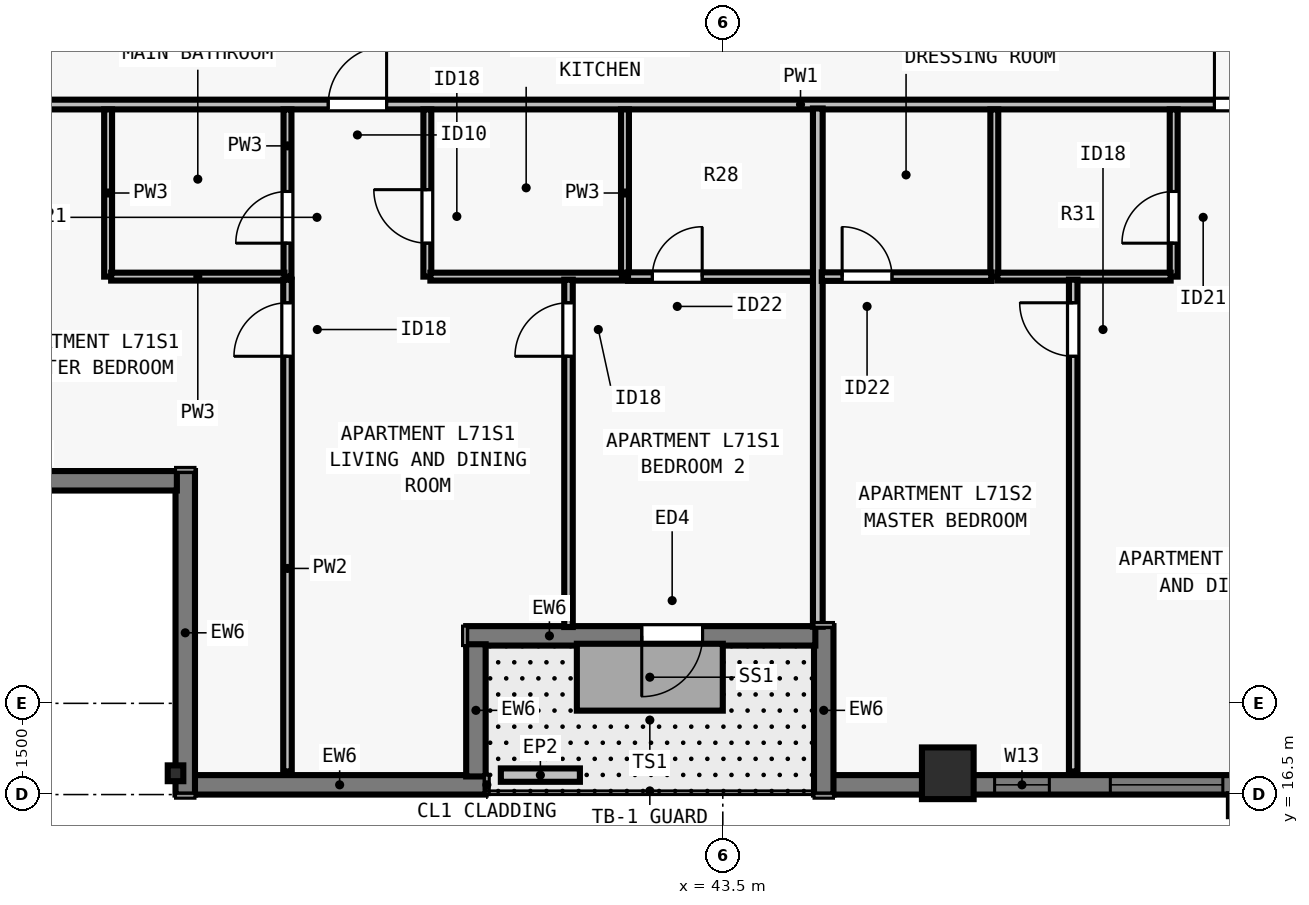
"""IFC4 building model, lengths in metres.
Left out: names, types, materials, properties, quantities, classifications, styles, units other than length and angle.
Written with IfcOpenShell. Run it as: python <this file> out.ifc"""

import sys

from ifc_helpers import new_model, si_unit, direction, frame, frame_2d, origin, origin_2d, place, context, subcontext, project, spatial, rectangle, i_section, extrude, element, fill, save


model = new_model("IFC4")
c1 = context("Model", 3, precision=1e-05, world=origin(), true_north=direction((0.0, 1.0)))
c2 = subcontext(c1, "Body", "Model", "MODEL_VIEW")
j1 = project(units=[si_unit("LENGTHUNIT", "METRE"), si_unit("PLANEANGLEUNIT", "RADIAN")], contexts=[c1])
p1 = place(None, origin())
s1 = spatial("IfcSite", under=j1, at=p1, CompositionType="ELEMENT")
p2 = place(p1, origin())
s2 = spatial("IfcBuilding", under=s1, at=p2, CompositionType="ELEMENT")
p3 = place(p2, frame((0.0, 0.0, 258.5)))
s3 = spatial("IfcBuildingStorey", under=s2, at=p3, CompositionType="ELEMENT", Elevation=258.5)
p4 = place(p3, frame((34.5, 16.85, 0.0), z_axis=(0.0, 0.0, 1.0), x_axis=(1.0, 0.0, 0.0)))
e1 = element("IfcColumn", 1, at=p4, inside=s3, PredefinedType="COLUMN", context=c2, shape_type="SweptSolid", body=[
    extrude(i_section(OverallWidth=0.256, OverallDepth=0.26, WebThickness=0.01, FlangeThickness=0.017, FilletRadius=0.013, at=origin_2d()), origin(), (0.0, 0.0, 1.0), 3.5),
])
p5 = place(p3, frame((47.2, 16.85, 0.0), z_axis=(0.0, 0.0, 1.0), x_axis=(1.0, 0.0, 0.0)))
e2 = element("IfcColumn", 2, at=p5, inside=s3, PredefinedType="COLUMN", context=c2, shape_type="SweptSolid", body=[
    extrude(rectangle(XDim=0.85, YDim=0.85, at=origin_2d()), origin(), (0.0, 0.0, 1.0), 3.5),
])
p6 = place(p3, frame((39.6, 16.66, 0.0), z_axis=(0.0, 0.0, 1.0), x_axis=(-1.0, 0.0, 0.0)))
e3 = element("IfcWall", 3, at=p6, inside=s3, PredefinedType="SOLIDWALL", context=c2, shape_type="SweptSolid", body=[
    extrude(rectangle(XDim=4.802, YDim=0.32, at=frame_2d((2.401, 0.0))), origin(), (0.0, 0.0, 1.0), 3.29),
])
p7 = place(p3, frame((34.66, 16.5, 0.0), z_axis=(0.0, 0.0, 1.0), x_axis=(0.0, 1.0, 0.0)))
e4 = element("IfcWall", 4, at=p7, inside=s3, PredefinedType="SOLIDWALL", context=c2, shape_type="SweptSolid", body=[
    extrude(rectangle(XDim=5.32, YDim=0.32, at=frame_2d((2.66, 0.0))), origin(), (0.0, 0.0, 1.0), 3.29),
])
p8 = place(p3, frame((34.522, 21.66, 0.0), z_axis=(0.0, 0.0, 1.0), x_axis=(-1.0, 0.0, 0.0)))
e5 = element("IfcWall", 5, at=p8, inside=s3, PredefinedType="SOLIDWALL", context=c2, shape_type="SweptSolid", body=[
    extrude(rectangle(XDim=4.724, YDim=0.32, at=frame_2d((2.362, 0.0))), origin(), (0.0, 0.0, 1.0), 3.29),
])
p9 = place(p3, frame((69.5, 16.66, 0.0), z_axis=(0.0, 0.0, 1.0), x_axis=(-1.0, 0.0, 0.0)))
e6 = element("IfcWall", 6, at=p9, inside=s3, PredefinedType="SOLIDWALL", context=c2, shape_type="SweptSolid", body=[
    extrude(rectangle(XDim=24.202, YDim=0.32, at=frame_2d((12.101, 0.0))), origin(), (0.0, 0.0, 1.0), 3.29),
])
p10 = place(p9, frame((8.026, 0.0, 0.8)))
e7 = element("IfcOpeningElement", 7, at=p10, cuts=e6, PredefinedType="OPENING", context=c2, shape_type="SweptSolid", body=[
    extrude(rectangle(XDim=1.55, YDim=1.678, at=frame_2d((0.775, 0.839))), frame((0.0, 0.17, 0.0), z_axis=(0.0, -1.0, 0.0), x_axis=(1.0, 0.0, 0.0)), (0.0, 0.0, 1.0), 0.34),
])
p11 = place(p9, frame((15.076, 0.0, 0.8)))
e8 = element("IfcOpeningElement", 8, at=p11, cuts=e6, PredefinedType="OPENING", context=c2, shape_type="SweptSolid", body=[
    extrude(rectangle(XDim=1.55, YDim=1.678, at=frame_2d((0.775, 0.839))), frame((0.0, 0.17, 0.0), z_axis=(0.0, -1.0, 0.0), x_axis=(1.0, 0.0, 0.0)), (0.0, 0.0, 1.0), 0.34),
])
p12 = place(p9, frame((17.777, 0.0, 0.8)))
e9 = element("IfcOpeningElement", 9, at=p12, cuts=e6, PredefinedType="OPENING", context=c2, shape_type="SweptSolid", body=[
    extrude(rectangle(XDim=1.85, YDim=1.678, at=frame_2d((0.925, 0.839))), frame((0.0, 0.17, 0.0), z_axis=(0.0, -1.0, 0.0), x_axis=(1.0, 0.0, 0.0)), (0.0, 0.0, 1.0), 0.34),
])
p13 = place(p9, frame((20.63, 0.0, 0.8)))
e10 = element("IfcOpeningElement", 10, at=p13, cuts=e6, PredefinedType="OPENING", context=c2, shape_type="SweptSolid", body=[
    extrude(rectangle(XDim=0.9, YDim=1.678, at=frame_2d((0.45, 0.839))), frame((0.0, 0.17, 0.0), z_axis=(0.0, -1.0, 0.0), x_axis=(1.0, 0.0, 0.0)), (0.0, 0.0, 1.0), 0.34),
])
p14 = place(p9, frame((10.87, 0.0, 0.8)))
e11 = element("IfcOpeningElement", 11, at=p14, cuts=e6, PredefinedType="OPENING", context=c2, shape_type="SweptSolid", body=[
    extrude(rectangle(XDim=0.9, YDim=1.678, at=frame_2d((0.45, 0.839))), frame((0.0, 0.17, 0.0), z_axis=(0.0, -1.0, 0.0), x_axis=(1.0, 0.0, 0.0)), (0.0, 0.0, 1.0), 0.34),
])
p15 = place(p3, frame((45.16, 16.5, 0.0), z_axis=(0.0, 0.0, 1.0), x_axis=(0.0, 1.0, 0.0)))
e12 = element("IfcWall", 12, at=p15, inside=s3, PredefinedType="SOLIDWALL", context=c2, shape_type="SweptSolid", body=[
    extrude(rectangle(XDim=2.77, YDim=0.32, at=frame_2d((1.385, 0.0))), origin(), (0.0, 0.0, 1.0), 3.29),
])
p16 = place(p3, frame((45.022, 19.11, 0.0), z_axis=(0.0, 0.0, 1.0), x_axis=(-1.0, 0.0, 0.0)))
e13 = element("IfcWall", 13, at=p16, inside=s3, PredefinedType="SOLIDWALL", context=c2, shape_type="SweptSolid", body=[
    extrude(rectangle(XDim=5.742, YDim=0.32, at=frame_2d((2.871, 0.0))), origin(), (0.0, 0.0, 1.0), 3.29),
])
p17 = place(p16, frame((1.855, 0.0, 0.0)))
e14 = element("IfcOpeningElement", 14, at=p17, cuts=e13, PredefinedType="OPENING", context=c2, shape_type="SweptSolid", body=[
    extrude(rectangle(XDim=1.0, YDim=2.15, at=frame_2d((0.5, 1.075))), frame((0.0, 0.17, 0.0), z_axis=(0.0, -1.0, 0.0), x_axis=(1.0, 0.0, 0.0)), (0.0, 0.0, 1.0), 0.34),
])
p18 = place(p3, frame((39.44, 18.972, 0.0), z_axis=(0.0, 0.0, 1.0), x_axis=(0.0, -1.0, 0.0)))
e15 = element("IfcWall", 15, at=p18, inside=s3, PredefinedType="SOLIDWALL", context=c2, shape_type="SweptSolid", body=[
    extrude(rectangle(XDim=2.174, YDim=0.32, at=frame_2d((1.087, 0.0))), origin(), (0.0, 0.0, 1.0), 3.29),
])
p19 = place(p3, frame((39.85, 16.82, 0.0), z_axis=(0.0, 0.0, 1.0), x_axis=(1.0, 0.0, 0.0)))
e16 = element("IfcWall", 16, at=p19, inside=s3, PredefinedType="PARAPET", context=c2, shape_type="SweptSolid", body=[
    extrude(rectangle(XDim=1.3, YDim=0.22, at=frame_2d((0.65, 0.0))), origin(), (0.0, 0.0, 1.0), 0.55),
])
p20 = place(p3, frame((29.805, 27.847, 0.0), z_axis=(0.0, 0.0, 1.0), x_axis=(1.0, 0.0, 0.0)))
e17 = element("IfcWall", 17, at=p20, inside=s3, PredefinedType="PARTITIONING", context=c2, shape_type="SweptSolid", body=[
    extrude(rectangle(XDim=44.39, YDim=0.16, at=frame_2d((22.195, 0.0))), origin(), (0.0, 0.0, 1.0), 2.958),
])
p21 = place(p20, frame((7.206, 0.0, 0.0)))
e18 = element("IfcOpeningElement", 18, at=p21, cuts=e17, PredefinedType="OPENING", context=c2, shape_type="SweptSolid", body=[
    extrude(rectangle(XDim=0.96, YDim=2.18, at=frame_2d((0.48, 1.09))), frame((0.0, 0.09, 0.0), z_axis=(0.0, -1.0, 0.0), x_axis=(1.0, 0.0, 0.0)), (0.0, 0.0, 1.0), 0.18),
])
p22 = place(p20, frame((21.78, 0.0, 0.0)))
e19 = element("IfcOpeningElement", 19, at=p22, cuts=e17, PredefinedType="OPENING", context=c2, shape_type="SweptSolid", body=[
    extrude(rectangle(XDim=0.96, YDim=2.18, at=frame_2d((0.48, 1.09))), frame((0.0, 0.09, 0.0), z_axis=(0.0, -1.0, 0.0), x_axis=(1.0, 0.0, 0.0)), (0.0, 0.0, 1.0), 0.18),
])
p23 = place(p20, frame((36.289, 0.0, 0.0)))
e20 = element("IfcOpeningElement", 20, at=p23, cuts=e17, PredefinedType="OPENING", context=c2, shape_type="SweptSolid", body=[
    extrude(rectangle(XDim=0.96, YDim=2.18, at=frame_2d((0.48, 1.09))), frame((0.0, 0.09, 0.0), z_axis=(0.0, -1.0, 0.0), x_axis=(1.0, 0.0, 0.0)), (0.0, 0.0, 1.0), 0.18),
])
p24 = place(p3, frame((33.391, 25.018, 0.0), z_axis=(0.0, 0.0, 1.0), x_axis=(0.0, 1.0, 0.0)))
e21 = element("IfcWall", 21, at=p24, inside=s3, PredefinedType="PLUMBINGWALL", context=c2, shape_type="SweptSolid", body=[
    extrude(rectangle(XDim=2.75, YDim=0.13, at=frame_2d((1.375, 0.0))), origin(), (0.0, 0.0, 1.0), 3.29),
])
p25 = place(p3, frame((36.341, 25.018, 0.0), z_axis=(0.0, 0.0, 1.0), x_axis=(0.0, 1.0, 0.0)))
e22 = element("IfcWall", 22, at=p25, inside=s3, PredefinedType="PLUMBINGWALL", context=c2, shape_type="SweptSolid", body=[
    extrude(rectangle(XDim=2.75, YDim=0.13, at=frame_2d((1.375, 0.0))), origin(), (0.0, 0.0, 1.0), 3.29),
])
p26 = place(p25, frame((0.55, 0.0, 0.0)))
e23 = element("IfcOpeningElement", 23, at=p26, cuts=e22, PredefinedType="OPENING", context=c2, shape_type="SweptSolid", body=[
    extrude(rectangle(XDim=0.85, YDim=2.08, at=frame_2d((0.425, 1.04))), frame((0.0, 0.075, 0.0), z_axis=(0.0, -1.0, 0.0), x_axis=(1.0, 0.0, 0.0)), (0.0, 0.0, 1.0), 0.15),
])
p27 = place(p3, frame((33.441, 25.018, 0.0), z_axis=(0.0, 0.0, 1.0), x_axis=(1.0, 0.0, 0.0)))
e24 = element("IfcWall", 24, at=p27, inside=s3, PredefinedType="PLUMBINGWALL", context=c2, shape_type="SweptSolid", body=[
    extrude(rectangle(XDim=2.85, YDim=0.13, at=frame_2d((1.425, 0.0))), origin(), (0.0, 0.0, 1.0), 2.958),
])
p28 = place(p3, frame((41.891, 25.018, 0.0), z_axis=(0.0, 0.0, 1.0), x_axis=(0.0, 1.0, 0.0)))
e25 = element("IfcWall", 25, at=p28, inside=s3, PredefinedType="PLUMBINGWALL", context=c2, shape_type="SweptSolid", body=[
    extrude(rectangle(XDim=2.75, YDim=0.13, at=frame_2d((1.375, 0.0))), origin(), (0.0, 0.0, 1.0), 3.29),
])
p29 = place(p3, frame((38.641, 25.018, 0.0), z_axis=(0.0, 0.0, 1.0), x_axis=(0.0, 1.0, 0.0)))
e26 = element("IfcWall", 26, at=p29, inside=s3, PredefinedType="PLUMBINGWALL", context=c2, shape_type="SweptSolid", body=[
    extrude(rectangle(XDim=2.75, YDim=0.13, at=frame_2d((1.375, 0.0))), origin(), (0.0, 0.0, 1.0), 3.29),
])
p30 = place(p29, frame((0.55, 0.0, 0.0)))
e27 = element("IfcOpeningElement", 27, at=p30, cuts=e26, PredefinedType="OPENING", context=c2, shape_type="SweptSolid", body=[
    extrude(rectangle(XDim=0.88, YDim=2.1, at=frame_2d((0.44, 1.05))), frame((0.0, 0.075, 0.0), z_axis=(0.0, -1.0, 0.0), x_axis=(1.0, 0.0, 0.0)), (0.0, 0.0, 1.0), 0.15),
])
p31 = place(p3, frame((38.691, 25.018, 0.0), z_axis=(0.0, 0.0, 1.0), x_axis=(1.0, 0.0, 0.0)))
e28 = element("IfcWall", 28, at=p31, inside=s3, PredefinedType="PLUMBINGWALL", context=c2, shape_type="SweptSolid", body=[
    extrude(rectangle(XDim=3.15, YDim=0.13, at=frame_2d((1.575, 0.0))), origin(), (0.0, 0.0, 1.0), 3.29),
])
p32 = place(p3, frame((36.341, 16.88, 0.0), z_axis=(0.0, 0.0, 1.0), x_axis=(0.0, 1.0, 0.0)))
e29 = element("IfcWall", 29, at=p32, inside=s3, PredefinedType="PARTITIONING", context=c2, shape_type="SweptSolid", body=[
    extrude(rectangle(XDim=8.088, YDim=0.14, at=frame_2d((4.044, 0.0))), origin(), (0.0, 0.0, 1.0), 2.573),
])
p33 = place(p32, frame((6.827, 0.0, 0.0)))
e30 = element("IfcOpeningElement", 30, at=p33, cuts=e29, PredefinedType="OPENING", context=c2, shape_type="SweptSolid", body=[
    extrude(rectangle(XDim=0.88, YDim=2.1, at=frame_2d((0.44, 1.05))), frame((0.0, 0.08, 0.0), z_axis=(0.0, -1.0, 0.0), x_axis=(1.0, 0.0, 0.0)), (0.0, 0.0, 1.0), 0.16),
])
p34 = place(p3, frame((40.962, 19.255, 0.0), z_axis=(0.0, 0.0, 1.0), x_axis=(0.0, 1.0, 0.0)))
e31 = element("IfcWall", 31, at=p34, inside=s3, PredefinedType="PARTITIONING", context=c2, shape_type="SweptSolid", body=[
    extrude(rectangle(XDim=5.713, YDim=0.14, at=frame_2d((2.856, 0.0))), origin(), (0.0, 0.0, 1.0), 3.29),
])
p35 = place(p34, frame((4.452, 0.0, 0.0)))
e32 = element("IfcOpeningElement", 32, at=p35, cuts=e31, PredefinedType="OPENING", context=c2, shape_type="SweptSolid", body=[
    extrude(rectangle(XDim=0.88, YDim=2.1, at=frame_2d((0.44, 1.05))), frame((0.0, 0.08, 0.0), z_axis=(0.0, -1.0, 0.0), x_axis=(1.0, 0.0, 0.0)), (0.0, 0.0, 1.0), 0.16),
])
p36 = place(p3, frame((41.941, 25.018, 0.0), z_axis=(0.0, 0.0, 1.0), x_axis=(1.0, 0.0, 0.0)))
e33 = element("IfcWall", 33, at=p36, inside=s3, PredefinedType="PARTITIONING", context=c2, shape_type="SweptSolid", body=[
    extrude(rectangle(XDim=3.171, YDim=0.14, at=frame_2d((1.586, 0.0))), origin(), (0.0, 0.0, 1.0), 3.29),
])
p37 = place(p36, frame((0.4, 0.0, 0.0)))
e34 = element("IfcOpeningElement", 34, at=p37, cuts=e33, PredefinedType="OPENING", context=c2, shape_type="SweptSolid", body=[
    extrude(rectangle(XDim=0.82, YDim=2.1, at=frame_2d((0.41, 1.05))), frame((0.0, 0.08, 0.0), z_axis=(0.0, -1.0, 0.0), x_axis=(1.0, 0.0, 0.0)), (0.0, 0.0, 1.0), 0.16),
])
p38 = place(p3, frame((45.062, 19.26, 0.0), z_axis=(0.0, 0.0, 1.0), x_axis=(0.0, 1.0, 0.0)))
e35 = element("IfcWall", 35, at=p38, inside=s3, PredefinedType="PARTITIONING", context=c2, shape_type="SweptSolid", body=[
    extrude(rectangle(XDim=8.522, YDim=0.16, at=frame_2d((4.261, 0.0))), origin(), (0.0, 0.0, 1.0), 3.29),
])
p39 = place(p3, frame((47.965, 25.018, 0.0), z_axis=(0.0, 0.0, 1.0), x_axis=(0.0, 1.0, 0.0)))
e36 = element("IfcWall", 36, at=p39, inside=s3, PredefinedType="PLUMBINGWALL", context=c2, shape_type="SweptSolid", body=[
    extrude(rectangle(XDim=2.75, YDim=0.13, at=frame_2d((1.375, 0.0))), origin(), (0.0, 0.0, 1.0), 3.29),
])
p40 = place(p3, frame((50.915, 25.018, 0.0), z_axis=(0.0, 0.0, 1.0), x_axis=(0.0, 1.0, 0.0)))
e37 = element("IfcWall", 37, at=p40, inside=s3, PredefinedType="PLUMBINGWALL", context=c2, shape_type="SweptSolid", body=[
    extrude(rectangle(XDim=2.75, YDim=0.13, at=frame_2d((1.375, 0.0))), origin(), (0.0, 0.0, 1.0), 3.29),
])
p41 = place(p40, frame((0.55, 0.0, 0.0)))
e38 = element("IfcOpeningElement", 38, at=p41, cuts=e37, PredefinedType="OPENING", context=c2, shape_type="SweptSolid", body=[
    extrude(rectangle(XDim=0.85, YDim=2.08, at=frame_2d((0.425, 1.04))), frame((0.0, 0.075, 0.0), z_axis=(0.0, -1.0, 0.0), x_axis=(1.0, 0.0, 0.0)), (0.0, 0.0, 1.0), 0.15),
])
p42 = place(p3, frame((48.015, 25.018, 0.0), z_axis=(0.0, 0.0, 1.0), x_axis=(1.0, 0.0, 0.0)))
e39 = element("IfcWall", 39, at=p42, inside=s3, PredefinedType="PLUMBINGWALL", context=c2, shape_type="SweptSolid", body=[
    extrude(rectangle(XDim=2.85, YDim=0.13, at=frame_2d((1.425, 0.0))), origin(), (0.0, 0.0, 1.0), 3.29),
])
p43 = place(p3, frame((49.262, 16.88, 0.0), z_axis=(0.0, 0.0, 1.0), x_axis=(0.0, 1.0, 0.0)))
e40 = element("IfcWall", 40, at=p43, inside=s3, PredefinedType="PARTITIONING", context=c2, shape_type="SweptSolid", body=[
    extrude(rectangle(XDim=8.088, YDim=0.14, at=frame_2d((4.044, 0.0))), origin(), (0.0, 0.0, 1.0), 2.958),
])
p44 = place(p43, frame((6.827, 0.0, 0.0)))
e41 = element("IfcOpeningElement", 41, at=p44, cuts=e40, PredefinedType="OPENING", context=c2, shape_type="SweptSolid", body=[
    extrude(rectangle(XDim=0.88, YDim=2.1, at=frame_2d((0.44, 1.05))), frame((0.0, 0.08, 0.0), z_axis=(0.0, -1.0, 0.0), x_axis=(1.0, 0.0, 0.0)), (0.0, 0.0, 1.0), 0.16),
])
p45 = place(p3, frame((45.127, 25.018, 0.0), z_axis=(0.0, 0.0, 1.0), x_axis=(1.0, 0.0, 0.0)))
e42 = element("IfcWall", 42, at=p45, inside=s3, PredefinedType="PARTITIONING", context=c2, shape_type="SweptSolid", body=[
    extrude(rectangle(XDim=2.788, YDim=0.14, at=frame_2d((1.394, 0.0))), origin(), (0.0, 0.0, 1.0), 3.29),
])
p46 = place(p45, frame((0.335, 0.0, 0.0)))
e43 = element("IfcOpeningElement", 43, at=p46, cuts=e42, PredefinedType="OPENING", context=c2, shape_type="SweptSolid", body=[
    extrude(rectangle(XDim=0.82, YDim=2.1, at=frame_2d((0.41, 1.05))), frame((0.0, 0.08, 0.0), z_axis=(0.0, -1.0, 0.0), x_axis=(1.0, 0.0, 0.0)), (0.0, 0.0, 1.0), 0.16),
])
p47 = place(p12, origin())
e44 = element("IfcWindow", 44, at=p47, inside=s3, PartitioningType="SINGLE_PANEL", PredefinedType="WINDOW", context=c2, shape_type="SweptSolid", body=[
    extrude(rectangle(XDim=1.85, YDim=1.678, at=frame_2d((0.925, 0.839))), frame((0.0, -0.05, 0.0), z_axis=(0.0, -1.0, 0.0), x_axis=(1.0, 0.0, 0.0)), (0.0, 0.0, 1.0), 0.06),
])
fill(e9, e44)
p48 = place(p17, origin())
e45 = element("IfcDoor", 45, at=p48, inside=s3, OperationType="SINGLE_SWING_RIGHT", PredefinedType="DOOR", context=c2, shape_type="SweptSolid", body=[
    extrude(rectangle(XDim=1.0, YDim=2.15, at=frame_2d((0.5, 1.075))), frame((0.0, 0.025, 0.0), z_axis=(0.0, -1.0, 0.0), x_axis=(1.0, 0.0, 0.0)), (0.0, 0.0, 1.0), 0.05),
])
fill(e14, e45)
p49 = place(p13, origin())
e46 = element("IfcWindow", 46, at=p49, inside=s3, PartitioningType="SINGLE_PANEL", PredefinedType="WINDOW", context=c2, shape_type="SweptSolid", body=[
    extrude(rectangle(XDim=0.9, YDim=1.678, at=frame_2d((0.45, 0.839))), frame((0.0, -0.04, 0.0), z_axis=(0.0, -1.0, 0.0), x_axis=(1.0, 0.0, 0.0)), (0.0, 0.0, 1.0), 0.06),
])
fill(e10, e46)
p50 = place(p26, origin())
e47 = element("IfcDoor", 47, at=p50, inside=s3, OperationType="SINGLE_SWING_LEFT", PredefinedType="DOOR", context=c2, shape_type="SweptSolid", body=[
    extrude(rectangle(XDim=0.85, YDim=2.08, at=frame_2d((0.425, 1.04))), frame((0.0, 0.025, 0.0), z_axis=(0.0, -1.0, 0.0), x_axis=(1.0, 0.0, 0.0)), (0.0, 0.0, 1.0), 0.05),
])
fill(e23, e47)
p51 = place(p30, origin())
e48 = element("IfcDoor", 48, at=p51, inside=s3, OperationType="SINGLE_SWING_RIGHT", PredefinedType="DOOR", context=c2, shape_type="SweptSolid", body=[
    extrude(rectangle(XDim=0.88, YDim=2.1, at=frame_2d((0.44, 1.05))), frame((0.0, 0.025, 0.0), z_axis=(0.0, -1.0, 0.0), x_axis=(1.0, 0.0, 0.0)), (0.0, 0.0, 1.0), 0.05),
])
fill(e27, e48)
p52 = place(p33, origin())
e49 = element("IfcDoor", 49, at=p52, inside=s3, OperationType="SINGLE_SWING_LEFT", PredefinedType="DOOR", context=c2, shape_type="SweptSolid", body=[
    extrude(rectangle(XDim=0.88, YDim=2.1, at=frame_2d((0.44, 1.05))), frame((0.0, 0.025, 0.0), z_axis=(0.0, -1.0, 0.0), x_axis=(1.0, 0.0, 0.0)), (0.0, 0.0, 1.0), 0.05),
])
fill(e30, e49)
p53 = place(p37, origin())
e50 = element("IfcDoor", 50, at=p53, inside=s3, OperationType="SINGLE_SWING_RIGHT", PredefinedType="DOOR", context=c2, shape_type="SweptSolid", body=[
    extrude(rectangle(XDim=0.82, YDim=2.1, at=frame_2d((0.41, 1.05))), frame((0.0, 0.025, 0.0), z_axis=(0.0, -1.0, 0.0), x_axis=(1.0, 0.0, 0.0)), (0.0, 0.0, 1.0), 0.05),
])
fill(e34, e50)
p54 = place(p35, origin())
e51 = element("IfcDoor", 51, at=p54, inside=s3, OperationType="SINGLE_SWING_LEFT", PredefinedType="DOOR", context=c2, shape_type="SweptSolid", body=[
    extrude(rectangle(XDim=0.88, YDim=2.1, at=frame_2d((0.44, 1.05))), frame((0.0, 0.025, 0.0), z_axis=(0.0, -1.0, 0.0), x_axis=(1.0, 0.0, 0.0)), (0.0, 0.0, 1.0), 0.05),
])
fill(e32, e51)
p55 = place(p21, origin())
e52 = element("IfcDoor", 52, at=p55, inside=s3, OperationType="SINGLE_SWING_RIGHT", PredefinedType="DOOR", context=c2, shape_type="SweptSolid", body=[
    extrude(rectangle(XDim=0.96, YDim=2.18, at=frame_2d((0.48, 1.09))), frame((0.0, 0.025, 0.0), z_axis=(0.0, -1.0, 0.0), x_axis=(1.0, 0.0, 0.0)), (0.0, 0.0, 1.0), 0.05),
])
fill(e18, e52)
p56 = place(p41, origin())
e53 = element("IfcDoor", 53, at=p56, inside=s3, OperationType="SINGLE_SWING_LEFT", PredefinedType="DOOR", context=c2, shape_type="SweptSolid", body=[
    extrude(rectangle(XDim=0.85, YDim=2.08, at=frame_2d((0.425, 1.04))), frame((0.0, 0.025, 0.0), z_axis=(0.0, -1.0, 0.0), x_axis=(1.0, 0.0, 0.0)), (0.0, 0.0, 1.0), 0.05),
])
fill(e38, e53)
p57 = place(p46, origin())
e54 = element("IfcDoor", 54, at=p57, inside=s3, OperationType="SINGLE_SWING_LEFT", PredefinedType="DOOR", context=c2, shape_type="SweptSolid", body=[
    extrude(rectangle(XDim=0.82, YDim=2.1, at=frame_2d((0.41, 1.05))), frame((0.0, 0.025, 0.0), z_axis=(0.0, -1.0, 0.0), x_axis=(1.0, 0.0, 0.0)), (0.0, 0.0, 1.0), 0.05),
])
fill(e43, e54)
p58 = place(p44, origin())
e55 = element("IfcDoor", 55, at=p58, inside=s3, OperationType="SINGLE_SWING_RIGHT", PredefinedType="DOOR", context=c2, shape_type="SweptSolid", body=[
    extrude(rectangle(XDim=0.88, YDim=2.1, at=frame_2d((0.44, 1.05))), frame((0.0, 0.025, 0.0), z_axis=(0.0, -1.0, 0.0), x_axis=(1.0, 0.0, 0.0)), (0.0, 0.0, 1.0), 0.05),
])
fill(e41, e55)
p59 = place(p22, origin())
e56 = element("IfcDoor", 56, at=p59, inside=s3, OperationType="SINGLE_SWING_LEFT", PredefinedType="DOOR", context=c2, shape_type="SweptSolid", body=[
    extrude(rectangle(XDim=0.96, YDim=2.18, at=frame_2d((0.48, 1.09))), frame((0.0, 0.025, 0.0), z_axis=(0.0, -1.0, 0.0), x_axis=(1.0, 0.0, 0.0)), (0.0, 0.0, 1.0), 0.05),
])
fill(e19, e56)
save(model, sys.argv[1])
